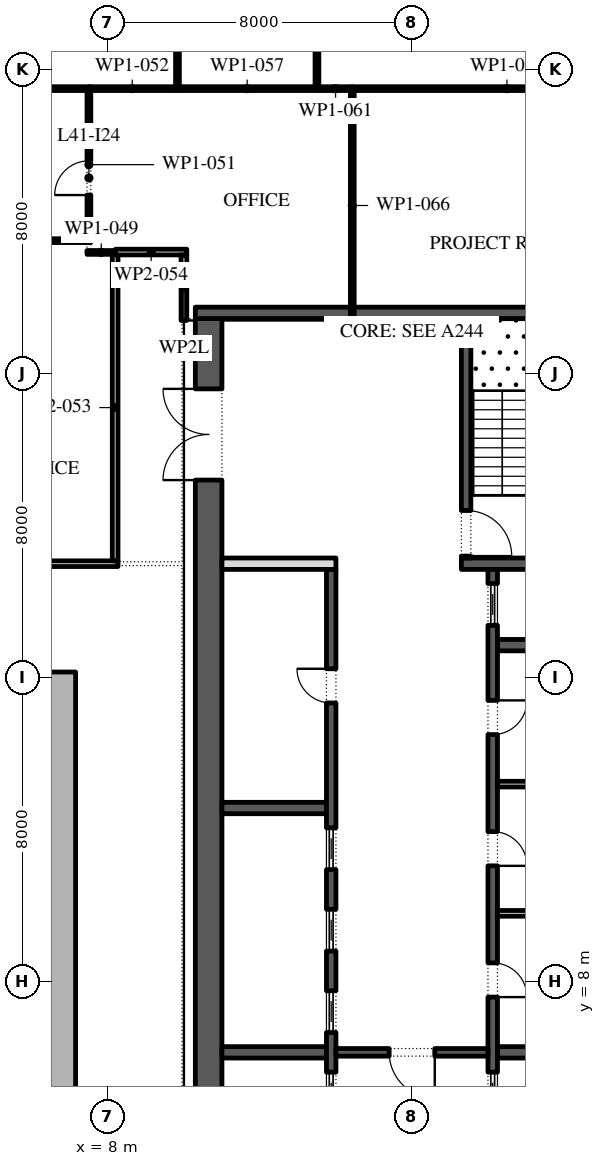
"""IFC4 building model, lengths in metres.
Left out: names, types, materials, properties, quantities, classifications, styles, units other than length and angle.
Written with IfcOpenShell. Run it as: python <this file> out.ifc"""

import sys

from ifc_helpers import new_model, si_unit, direction, frame, frame_2d, origin, place, context, subcontext, project, spatial, polyline, rectangle, outline, extrude, element, fill, save


model = new_model("IFC4")
c1 = context("Model", 3, precision=1e-05, world=origin(), true_north=direction((0.0, 1.0)))
c2 = subcontext(c1, "Body", "Model", "MODEL_VIEW")
j1 = project(units=[si_unit("LENGTHUNIT", "METRE"), si_unit("PLANEANGLEUNIT", "RADIAN")], contexts=[c1])
p1 = place(None, origin())
s1 = spatial("IfcSite", under=j1, at=p1, CompositionType="ELEMENT")
p2 = place(p1, origin())
s2 = spatial("IfcBuilding", under=s1, at=p2, CompositionType="ELEMENT")
p3 = place(p2, frame((0.0, 0.0, 188.4)))
s3 = spatial("IfcBuildingStorey", under=s2, at=p3, CompositionType="ELEMENT", Elevation=188.4)
p4 = place(p3, origin())
e1 = element("IfcWall", 1, at=p4, inside=s3, PredefinedType="STANDARD", context=c2, shape_type="SweptSolid", body=[
    extrude(outline(polyline([(-7.15, -2.15), (7.15, -2.15), (7.15, 16.15), (-7.15, 16.15), (-7.15, -2.15)]), holes=[polyline([(-7.0, -2.0), (-7.0, 16.0), (7.0, 16.0), (7.0, -2.0), (-7.0, -2.0)])]), origin(), (0.0, 0.0, 1.0), 4.0),
])
p5 = place(p3, frame((10.65, -2.45, 0.0), z_axis=(0.0, 0.0, 1.0), x_axis=(0.0, 1.0, 0.0)))
e2 = element("IfcWall", 2, at=p5, inside=s3, PredefinedType="SHEAR", context=c2, shape_type="SweptSolid", body=[
    extrude(rectangle(XDim=27.9, YDim=0.7, at=frame_2d((13.95, 0.0))), origin(), (0.0, 0.0, 1.0), 4.0),
])
p6 = place(p5, frame((23.65, 0.0, 0.0)))
e3 = element("IfcOpeningElement", 3, at=p6, cuts=e2, PredefinedType="OPENING", context=c2, shape_type="SweptSolid", body=[
    extrude(rectangle(XDim=2.4, YDim=2.1, at=frame_2d((1.2, 1.05))), frame((0.0, 0.36, 0.0), z_axis=(0.0, -1.0, 0.0), x_axis=(1.0, 0.0, 0.0)), (0.0, 0.0, 1.0), 0.72),
])
p7 = place(p5, frame((1.387, 0.0, 0.0)))
e4 = element("IfcOpeningElement", 4, at=p7, cuts=e2, PredefinedType="OPENING", context=c2, shape_type="SweptSolid", body=[
    extrude(rectangle(XDim=0.9, YDim=2.1, at=frame_2d((0.45, 1.05))), frame((0.0, 0.36, 0.0), z_axis=(0.0, -1.0, 0.0), x_axis=(1.0, 0.0, 0.0)), (0.0, 0.0, 1.0), 0.72),
])
p8 = place(p5, frame((4.562, 0.0, 0.0)))
e5 = element("IfcOpeningElement", 5, at=p8, cuts=e2, PredefinedType="OPENING", context=c2, shape_type="SweptSolid", body=[
    extrude(rectangle(XDim=1.0, YDim=2.1, at=frame_2d((0.5, 1.05))), frame((0.0, 0.36, 0.0), z_axis=(0.0, -1.0, 0.0), x_axis=(1.0, 0.0, 0.0)), (0.0, 0.0, 1.0), 0.72),
])
p9 = place(p3, frame((10.3, 25.6, 0.0), z_axis=(0.0, 0.0, 1.0), x_axis=(1.0, 0.0, 0.0)))
e6 = element("IfcWall", 6, at=p9, inside=s3, PredefinedType="SHEAR", context=c2, shape_type="SweptSolid", body=[
    extrude(rectangle(XDim=11.4, YDim=0.3, at=frame_2d((5.7, 0.0))), origin(), (0.0, 0.0, 1.0), 4.0),
])
p10 = place(p3, frame((17.3, 19.0, 0.0), z_axis=(0.0, 0.0, 1.0), x_axis=(1.0, 0.0, 0.0)))
e7 = element("IfcWall", 7, at=p10, inside=s3, PredefinedType="SHEAR", context=c2, shape_type="SweptSolid", body=[
    extrude(rectangle(XDim=3.7, YDim=0.3, at=frame_2d((1.85, 0.0))), origin(), (0.0, 0.0, 1.0), 4.0),
])
p11 = place(p3, frame((17.425, 19.15, 0.0), z_axis=(0.0, 0.0, 1.0), x_axis=(0.0, 1.0, 0.0)))
e8 = element("IfcWall", 8, at=p11, inside=s3, PredefinedType="SHEAR", context=c2, shape_type="SweptSolid", body=[
    extrude(rectangle(XDim=6.3, YDim=0.25, at=frame_2d((3.15, 0.0))), origin(), (0.0, 0.0, 1.0), 4.0),
])
p12 = place(p11, frame((0.05, 0.0, 0.0)))
e9 = element("IfcOpeningElement", 9, at=p12, cuts=e8, PredefinedType="OPENING", context=c2, shape_type="SweptSolid", body=[
    extrude(rectangle(XDim=1.2, YDim=2.1, at=frame_2d((0.6, 1.05))), frame((0.0, 0.135, 0.0), z_axis=(0.0, -1.0, 0.0), x_axis=(1.0, 0.0, 0.0)), (0.0, 0.0, 1.0), 0.27),
])
for number, where, z_axis, x_axis in (
    (10, (18.25, 6.143, 0.0), (0.0, 0.0, 1.0), (1.0, 0.0, 0.0)),
    (11, (18.25, 16.857, 0.0), (0.0, 0.0, 1.0), (1.0, 0.0, 0.0)),
):
    element("IfcWall", number, at=place(p3, frame(where, z_axis=z_axis, x_axis=x_axis)), inside=s3, PredefinedType="SHEAR", context=c2, shape_type="SweptSolid", body=[
        extrude(rectangle(XDim=2.75, YDim=0.3, at=frame_2d((1.375, 0.0))), origin(), (0.0, 0.0, 1.0), 4.0),
    ])
p13 = place(p3, frame((18.125, 4.15, 0.0), z_axis=(0.0, 0.0, 1.0), x_axis=(0.0, 1.0, 0.0)))
e12 = element("IfcWall", 12, at=p13, inside=s3, PredefinedType="SHEAR", context=c2, shape_type="SweptSolid", body=[
    extrude(rectangle(XDim=14.7, YDim=0.25, at=frame_2d((7.35, 0.0))), origin(), (0.0, 0.0, 1.0), 4.0),
])
p14 = place(p13, frame((3.446, 0.0, 0.0)))
e13 = element("IfcOpeningElement", 13, at=p14, cuts=e12, PredefinedType="OPENING", context=c2, shape_type="SweptSolid", body=[
    extrude(rectangle(XDim=0.9, YDim=2.1, at=frame_2d((0.45, 1.05))), frame((0.0, 0.135, 0.0), z_axis=(0.0, -1.0, 0.0), x_axis=(1.0, 0.0, 0.0)), (0.0, 0.0, 1.0), 0.27),
])
p15 = place(p13, frame((6.9, 0.0, 0.0)))
e14 = element("IfcOpeningElement", 14, at=p15, cuts=e12, PredefinedType="OPENING", context=c2, shape_type="SweptSolid", body=[
    extrude(rectangle(XDim=0.9, YDim=2.1, at=frame_2d((0.45, 1.05))), frame((0.0, 0.135, 0.0), z_axis=(0.0, -1.0, 0.0), x_axis=(1.0, 0.0, 0.0)), (0.0, 0.0, 1.0), 0.27),
])
p16 = place(p13, frame((10.354, 0.0, 0.0)))
e15 = element("IfcOpeningElement", 15, at=p16, cuts=e12, PredefinedType="OPENING", context=c2, shape_type="SweptSolid", body=[
    extrude(rectangle(XDim=0.9, YDim=2.1, at=frame_2d((0.45, 1.05))), frame((0.0, 0.135, 0.0), z_axis=(0.0, -1.0, 0.0), x_axis=(1.0, 0.0, 0.0)), (0.0, 0.0, 1.0), 0.27),
])
p17 = place(p13, frame((0.371, 0.0, 0.0)))
e16 = element("IfcOpeningElement", 16, at=p17, cuts=e12, PredefinedType="OPENING", context=c2, shape_type="SweptSolid", body=[
    extrude(rectangle(XDim=1.1, YDim=2.1, at=frame_2d((0.55, 1.05))), frame((0.0, 0.135, 0.0), z_axis=(0.0, -1.0, 0.0), x_axis=(1.0, 0.0, 0.0)), (0.0, 0.0, 1.0), 0.27),
])
p18 = place(p13, frame((13.229, 0.0, 0.0)))
e17 = element("IfcOpeningElement", 17, at=p18, cuts=e12, PredefinedType="OPENING", context=c2, shape_type="SweptSolid", body=[
    extrude(rectangle(XDim=1.1, YDim=2.1, at=frame_2d((0.55, 1.05))), frame((0.0, 0.135, 0.0), z_axis=(0.0, -1.0, 0.0), x_axis=(1.0, 0.0, 0.0)), (0.0, 0.0, 1.0), 0.27),
])
for number, where, z_axis, x_axis in (
    (18, (18.25, 9.8, 0.0), (0.0, 0.0, 1.0), (1.0, 0.0, 0.0)),
    (19, (18.25, 13.2, 0.0), (0.0, 0.0, 1.0), (1.0, 0.0, 0.0)),
):
    element("IfcWall", number, at=place(p3, frame(where, z_axis=z_axis, x_axis=x_axis)), inside=s3, PredefinedType="PARTITIONING", context=c2, shape_type="SweptSolid", body=[
        extrude(rectangle(XDim=2.75, YDim=0.15, at=frame_2d((1.375, 0.0))), origin(), (0.0, 0.0, 1.0), 4.0),
    ])
for number, where, z_axis, x_axis in (
    (20, (11.0, 6.143, 0.0), (0.0, 0.0, 1.0), (1.0, 0.0, 0.0)),
    (21, (11.0, 12.571, 0.0), (0.0, 0.0, 1.0), (1.0, 0.0, 0.0)),
):
    element("IfcWall", number, at=place(p3, frame(where, z_axis=z_axis, x_axis=x_axis)), inside=s3, PredefinedType="SHEAR", context=c2, shape_type="SweptSolid", body=[
        extrude(rectangle(XDim=2.75, YDim=0.3, at=frame_2d((1.375, 0.0))), origin(), (0.0, 0.0, 1.0), 4.0),
    ])
p19 = place(p3, frame((13.875, -2.45, 0.0), z_axis=(0.0, 0.0, 1.0), x_axis=(0.0, 1.0, 0.0)))
e22 = element("IfcWall", 22, at=p19, inside=s3, PredefinedType="SHEAR", context=c2, shape_type="SweptSolid", body=[
    extrude(rectangle(XDim=21.3, YDim=0.25, at=frame_2d((10.65, 0.0))), origin(), (0.0, 0.0, 1.0), 4.0),
])
p20 = place(p19, frame((17.786, 0.0, 0.0)))
e23 = element("IfcOpeningElement", 23, at=p20, cuts=e22, PredefinedType="OPENING", context=c2, shape_type="SweptSolid", body=[
    extrude(rectangle(XDim=0.9, YDim=2.1, at=frame_2d((0.45, 1.05))), frame((0.0, 0.135, 0.0), z_axis=(0.0, -1.0, 0.0), x_axis=(1.0, 0.0, 0.0)), (0.0, 0.0, 1.0), 0.27),
])
p21 = place(p19, frame((6.971, 0.0, 0.0)))
e24 = element("IfcOpeningElement", 24, at=p21, cuts=e22, PredefinedType="OPENING", context=c2, shape_type="SweptSolid", body=[
    extrude(rectangle(XDim=1.1, YDim=2.1, at=frame_2d((0.55, 1.05))), frame((0.0, 0.135, 0.0), z_axis=(0.0, -1.0, 0.0), x_axis=(1.0, 0.0, 0.0)), (0.0, 0.0, 1.0), 0.27),
])
p22 = place(p19, frame((9.114, 0.0, 0.0)))
e25 = element("IfcOpeningElement", 25, at=p22, cuts=e22, PredefinedType="OPENING", context=c2, shape_type="SweptSolid", body=[
    extrude(rectangle(XDim=1.1, YDim=2.1, at=frame_2d((0.55, 1.05))), frame((0.0, 0.135, 0.0), z_axis=(0.0, -1.0, 0.0), x_axis=(1.0, 0.0, 0.0)), (0.0, 0.0, 1.0), 0.27),
])
p23 = place(p19, frame((11.257, 0.0, 0.0)))
e26 = element("IfcOpeningElement", 26, at=p23, cuts=e22, PredefinedType="OPENING", context=c2, shape_type="SweptSolid", body=[
    extrude(rectangle(XDim=1.1, YDim=2.1, at=frame_2d((0.55, 1.05))), frame((0.0, 0.135, 0.0), z_axis=(0.0, -1.0, 0.0), x_axis=(1.0, 0.0, 0.0)), (0.0, 0.0, 1.0), 0.27),
])
p24 = place(p19, frame((13.4, 0.0, 0.0)))
e27 = element("IfcOpeningElement", 27, at=p24, cuts=e22, PredefinedType="OPENING", context=c2, shape_type="SweptSolid", body=[
    extrude(rectangle(XDim=1.1, YDim=2.1, at=frame_2d((0.55, 1.05))), frame((0.0, 0.135, 0.0), z_axis=(0.0, -1.0, 0.0), x_axis=(1.0, 0.0, 0.0)), (0.0, 0.0, 1.0), 0.27),
])
p25 = place(p3, frame((11.0, 19.0, 0.0), z_axis=(0.0, 0.0, 1.0), x_axis=(1.0, 0.0, 0.0)))
e28 = element("IfcWall", 28, at=p25, inside=s3, PredefinedType="PARTITIONING", context=c2, shape_type="SweptSolid", body=[
    extrude(rectangle(XDim=3.0, YDim=0.3, at=frame_2d((1.5, 0.0))), origin(), (0.0, 0.0, 1.0), 4.0),
])
p26 = place(p3, frame((14.0, 6.143, 0.0), z_axis=(0.0, 0.0, 1.0), x_axis=(1.0, 0.0, 0.0)))
e29 = element("IfcWall", 29, at=p26, inside=s3, PredefinedType="SHEAR", context=c2, shape_type="SweptSolid", body=[
    extrude(rectangle(XDim=4.0, YDim=0.2, at=frame_2d((2.0, 0.0))), origin(), (0.0, 0.0, 1.0), 4.0),
])
p27 = place(p26, frame((1.4, 0.0, 0.0)))
e30 = element("IfcOpeningElement", 30, at=p27, cuts=e29, PredefinedType="OPENING", context=c2, shape_type="SweptSolid", body=[
    extrude(rectangle(XDim=1.2, YDim=2.1, at=frame_2d((0.6, 1.05))), frame((0.0, 0.11, 0.0), z_axis=(0.0, -1.0, 0.0), x_axis=(1.0, 0.0, 0.0)), (0.0, 0.0, 1.0), 0.22),
])
p28 = place(p3, frame((0.915, 19.0, 0.0), z_axis=(0.0, 0.0, 1.0), x_axis=(1.0, 0.0, 0.0)))
e31 = element("IfcWall", 31, at=p28, inside=s3, PredefinedType="PARTITIONING", context=c2, shape_type="SweptSolid", body=[
    extrude(rectangle(XDim=7.35, YDim=0.15, at=frame_2d((3.675, 0.0))), origin(), (0.0, 0.0, 1.0), 4.0),
])
p29 = place(p3, frame((1.065, 31.5, 0.0), z_axis=(0.0, 0.0, 1.0), x_axis=(1.0, 0.0, 0.0)))
e32 = element("IfcWall", 32, at=p29, inside=s3, PredefinedType="PARTITIONING", context=c2, shape_type="SweptSolid", body=[
    extrude(rectangle(XDim=6.485, YDim=0.1, at=frame_2d((3.243, 0.0))), origin(), (0.0, 0.0, 1.0), 4.0),
])
p30 = place(p3, frame((7.45, 27.19, 0.0), z_axis=(0.0, 0.0, 1.0), x_axis=(1.0, 0.0, 0.0)))
e33 = element("IfcWall", 33, at=p30, inside=s3, PredefinedType="PARTITIONING", context=c2, shape_type="SweptSolid", body=[
    extrude(rectangle(XDim=0.75, YDim=0.1, at=frame_2d((0.375, 0.0))), origin(), (0.0, 0.0, 1.0), 4.0),
])
p31 = place(p3, frame((7.55, 27.5, 0.0), z_axis=(0.0, 0.0, 1.0), x_axis=(-1.0, 0.0, 0.0)))
e34 = element("IfcWall", 34, at=p31, inside=s3, PredefinedType="PARTITIONING", context=c2, shape_type="SweptSolid", body=[
    extrude(rectangle(XDim=6.485, YDim=0.1, at=frame_2d((3.243, 0.0))), origin(), (0.0, 0.0, 1.0), 4.0),
])
p32 = place(p3, frame((7.5, 31.45, 0.0), z_axis=(0.0, 0.0, 1.0), x_axis=(0.0, -1.0, 0.0)))
e35 = element("IfcWall", 35, at=p32, inside=s3, PredefinedType="PARTITIONING", context=c2, shape_type="SweptSolid", body=[
    extrude(rectangle(XDim=3.9, YDim=0.1, at=frame_2d((1.95, 0.0))), origin(), (0.0, 0.0, 1.0), 4.0),
])
p33 = place(p32, frame((1.85, 0.0, 0.0)))
e36 = element("IfcOpeningElement", 36, at=p33, cuts=e35, PredefinedType="OPENING", context=c2, shape_type="SweptSolid", body=[
    extrude(rectangle(XDim=0.9, YDim=2.1, at=frame_2d((0.45, 1.05))), frame((0.0, 0.06, 0.0), z_axis=(0.0, -1.0, 0.0), x_axis=(1.0, 0.0, 0.0)), (0.0, 0.0, 1.0), 0.12),
])
p34 = place(p3, frame((7.5, 31.5, 0.0), z_axis=(0.0, 0.0, 1.0), x_axis=(1.0, 0.0, 0.0)))
e37 = element("IfcWall", 37, at=p34, inside=s3, PredefinedType="PARTITIONING", context=c2, shape_type="SweptSolid", body=[
    extrude(rectangle(XDim=2.28, YDim=0.1, at=frame_2d((1.14, 0.0))), origin(), (0.0, 0.0, 1.0), 4.0),
])
p35 = place(p3, frame((8.19, 19.075, 0.0), z_axis=(0.0, 0.0, 1.0), x_axis=(0.0, 1.0, 0.0)))
e38 = element("IfcWall", 38, at=p35, inside=s3, PredefinedType="PARTITIONING", context=c2, shape_type="SweptSolid", body=[
    extrude(rectangle(XDim=8.065, YDim=0.15, at=frame_2d((4.032, 0.0))), origin(), (0.0, 0.0, 1.0), 4.0),
])
p36 = place(p3, frame((8.2, 27.2, 0.0), z_axis=(0.0, 0.0, 1.0), x_axis=(1.0, 0.0, 0.0)))
e39 = element("IfcWall", 39, at=p36, inside=s3, PredefinedType="PARTITIONING", context=c2, shape_type="SweptSolid", body=[
    extrude(rectangle(XDim=1.875, YDim=0.15, at=frame_2d((0.938, 0.0))), origin(), (0.0, 0.0, 1.0), 4.0),
])
p37 = place(p3, frame((9.78, 31.5, 0.0), z_axis=(0.0, 0.0, 1.0), x_axis=(1.0, 0.0, 0.0)))
e40 = element("IfcWall", 40, at=p37, inside=s3, PredefinedType="PARTITIONING", context=c2, shape_type="SweptSolid", body=[
    extrude(rectangle(XDim=3.77, YDim=0.1, at=frame_2d((1.885, 0.0))), origin(), (0.0, 0.0, 1.0), 4.0),
])
p38 = place(p3, frame((9.83, 39.95, 0.0), z_axis=(0.0, 0.0, 1.0), x_axis=(0.0, -1.0, 0.0)))
e41 = element("IfcWall", 41, at=p38, inside=s3, PredefinedType="PARTITIONING", context=c2, shape_type="SweptSolid", body=[
    extrude(rectangle(XDim=8.4, YDim=0.1, at=frame_2d((4.2, 0.0))), origin(), (0.0, 0.0, 1.0), 4.0),
])
p39 = place(p38, frame((4.6, 0.0, 0.0)))
e42 = element("IfcOpeningElement", 42, at=p39, cuts=e41, PredefinedType="OPENING", context=c2, shape_type="SweptSolid", body=[
    extrude(rectangle(XDim=0.9, YDim=2.1, at=frame_2d((0.45, 1.05))), frame((0.0, 0.06, 0.0), z_axis=(0.0, -1.0, 0.0), x_axis=(1.0, 0.0, 0.0)), (0.0, 0.0, 1.0), 0.12),
])
p40 = place(p3, frame((10.0, 27.125, 0.0), z_axis=(0.0, 0.0, 1.0), x_axis=(0.0, -1.0, 0.0)))
e43 = element("IfcWall", 43, at=p40, inside=s3, PredefinedType="PARTITIONING", context=c2, shape_type="SweptSolid", body=[
    extrude(rectangle(XDim=1.725, YDim=0.15, at=frame_2d((0.863, 0.0))), origin(), (0.0, 0.0, 1.0), 3.02),
])
p41 = place(p3, frame((13.55, 31.5, 0.0), z_axis=(0.0, 0.0, 1.0), x_axis=(1.0, 0.0, 0.0)))
e44 = element("IfcWall", 44, at=p41, inside=s3, PredefinedType="PARTITIONING", context=c2, shape_type="SweptSolid", body=[
    extrude(rectangle(XDim=0.88, YDim=0.1, at=frame_2d((0.44, 0.0))), origin(), (0.0, 0.0, 1.0), 4.0),
])
p42 = place(p3, frame((13.5, 39.95, 0.0), z_axis=(0.0, 0.0, 1.0), x_axis=(0.0, -1.0, 0.0)))
e45 = element("IfcWall", 45, at=p42, inside=s3, PredefinedType="PARTITIONING", context=c2, shape_type="SweptSolid", body=[
    extrude(rectangle(XDim=8.4, YDim=0.1, at=frame_2d((4.2, 0.0))), origin(), (0.0, 0.0, 1.0), 4.0),
])
p43 = place(p3, frame((14.43, 31.45, 0.0), z_axis=(0.0, 0.0, 1.0), x_axis=(0.0, -1.0, 0.0)))
e46 = element("IfcWall", 46, at=p43, inside=s3, PredefinedType="PARTITIONING", context=c2, shape_type="SweptSolid", body=[
    extrude(rectangle(XDim=6.05, YDim=0.1, at=frame_2d((3.025, 0.0))), origin(), (0.0, 0.0, 1.0), 4.0),
])
p44 = place(p3, frame((14.43, 31.5, 0.0), z_axis=(0.0, 0.0, 1.0), x_axis=(1.0, 0.0, 0.0)))
e47 = element("IfcWall", 47, at=p44, inside=s3, PredefinedType="PARTITIONING", context=c2, shape_type="SweptSolid", body=[
    extrude(rectangle(XDim=8.14, YDim=0.1, at=frame_2d((4.07, 0.0))), origin(), (0.0, 0.0, 1.0), 4.0),
])
p45 = place(p14, frame((0.9, -0.2, 0.0), z_axis=(0.0, 0.0, 1.0), x_axis=(-1.0, 0.0, 0.0)))
e48 = element("IfcDoor", 48, at=p45, inside=s3, OperationType="SINGLE_SWING_LEFT", PredefinedType="DOOR", context=c2, shape_type="SweptSolid", body=[
    extrude(rectangle(XDim=0.9, YDim=2.1, at=frame_2d((0.45, 1.05))), frame((0.0, -0.075, 0.0), z_axis=(0.0, -1.0, 0.0), x_axis=(1.0, 0.0, 0.0)), (0.0, 0.0, 1.0), 0.05),
])
fill(e13, e48)
p46 = place(p15, frame((0.9, -0.2, 0.0), z_axis=(0.0, 0.0, 1.0), x_axis=(-1.0, 0.0, 0.0)))
e49 = element("IfcDoor", 49, at=p46, inside=s3, OperationType="SINGLE_SWING_LEFT", PredefinedType="DOOR", context=c2, shape_type="SweptSolid", body=[
    extrude(rectangle(XDim=0.9, YDim=2.1, at=frame_2d((0.45, 1.05))), frame((0.0, -0.075, 0.0), z_axis=(0.0, -1.0, 0.0), x_axis=(1.0, 0.0, 0.0)), (0.0, 0.0, 1.0), 0.05),
])
fill(e14, e49)
p47 = place(p16, frame((0.9, -0.2, 0.0), z_axis=(0.0, 0.0, 1.0), x_axis=(-1.0, 0.0, 0.0)))
e50 = element("IfcDoor", 50, at=p47, inside=s3, OperationType="SINGLE_SWING_RIGHT", PredefinedType="DOOR", context=c2, shape_type="SweptSolid", body=[
    extrude(rectangle(XDim=0.9, YDim=2.1, at=frame_2d((0.45, 1.05))), frame((0.0, -0.075, 0.0), z_axis=(0.0, -1.0, 0.0), x_axis=(1.0, 0.0, 0.0)), (0.0, 0.0, 1.0), 0.05),
])
fill(e15, e50)
p48 = place(p17, origin())
e51 = element("IfcDoor", 51, at=p48, inside=s3, OperationType="SLIDING_TO_LEFT", PredefinedType="DOOR", context=c2, shape_type="SweptSolid", body=[
    extrude(rectangle(XDim=1.1, YDim=2.1, at=frame_2d((0.55, 1.05))), frame((0.0, 0.025, 0.0), z_axis=(0.0, -1.0, 0.0), x_axis=(1.0, 0.0, 0.0)), (0.0, 0.0, 1.0), 0.05),
])
fill(e16, e51)
p49 = place(p18, origin())
e52 = element("IfcDoor", 52, at=p49, inside=s3, OperationType="SLIDING_TO_LEFT", PredefinedType="DOOR", context=c2, shape_type="SweptSolid", body=[
    extrude(rectangle(XDim=1.1, YDim=2.1, at=frame_2d((0.55, 1.05))), frame((0.0, 0.025, 0.0), z_axis=(0.0, -1.0, 0.0), x_axis=(1.0, 0.0, 0.0)), (0.0, 0.0, 1.0), 0.05),
])
fill(e17, e52)
p50 = place(p20, origin())
e53 = element("IfcDoor", 53, at=p50, inside=s3, OperationType="SINGLE_SWING_LEFT", PredefinedType="DOOR", context=c2, shape_type="SweptSolid", body=[
    extrude(rectangle(XDim=0.9, YDim=2.1, at=frame_2d((0.45, 1.05))), frame((0.0, 0.125, 0.0), z_axis=(0.0, -1.0, 0.0), x_axis=(1.0, 0.0, 0.0)), (0.0, 0.0, 1.0), 0.05),
])
fill(e23, e53)
p51 = place(p21, origin())
e54 = element("IfcDoor", 54, at=p51, inside=s3, OperationType="SLIDING_TO_LEFT", PredefinedType="DOOR", context=c2, shape_type="SweptSolid", body=[
    extrude(rectangle(XDim=1.1, YDim=2.1, at=frame_2d((0.55, 1.05))), frame((0.0, 0.025, 0.0), z_axis=(0.0, -1.0, 0.0), x_axis=(1.0, 0.0, 0.0)), (0.0, 0.0, 1.0), 0.05),
])
fill(e24, e54)
p52 = place(p22, origin())
e55 = element("IfcDoor", 55, at=p52, inside=s3, OperationType="SLIDING_TO_LEFT", PredefinedType="DOOR", context=c2, shape_type="SweptSolid", body=[
    extrude(rectangle(XDim=1.1, YDim=2.1, at=frame_2d((0.55, 1.05))), frame((0.0, 0.025, 0.0), z_axis=(0.0, -1.0, 0.0), x_axis=(1.0, 0.0, 0.0)), (0.0, 0.0, 1.0), 0.05),
])
fill(e25, e55)
p53 = place(p23, origin())
e56 = element("IfcDoor", 56, at=p53, inside=s3, OperationType="SLIDING_TO_LEFT", PredefinedType="DOOR", context=c2, shape_type="SweptSolid", body=[
    extrude(rectangle(XDim=1.1, YDim=2.1, at=frame_2d((0.55, 1.05))), frame((0.0, 0.025, 0.0), z_axis=(0.0, -1.0, 0.0), x_axis=(1.0, 0.0, 0.0)), (0.0, 0.0, 1.0), 0.05),
])
fill(e26, e56)
p54 = place(p24, origin())
e57 = element("IfcDoor", 57, at=p54, inside=s3, OperationType="SLIDING_TO_LEFT", PredefinedType="DOOR", context=c2, shape_type="SweptSolid", body=[
    extrude(rectangle(XDim=1.1, YDim=2.1, at=frame_2d((0.55, 1.05))), frame((0.0, 0.025, 0.0), z_axis=(0.0, -1.0, 0.0), x_axis=(1.0, 0.0, 0.0)), (0.0, 0.0, 1.0), 0.05),
])
fill(e27, e57)
p55 = place(p27, frame((1.2, 0.0, 0.0), z_axis=(0.0, 0.0, 1.0), x_axis=(-1.0, 0.0, 0.0)))
e58 = element("IfcDoor", 58, at=p55, inside=s3, OperationType="SINGLE_SWING_RIGHT", PredefinedType="DOOR", context=c2, shape_type="SweptSolid", body=[
    extrude(rectangle(XDim=1.2, YDim=2.1, at=frame_2d((0.6, 1.05))), frame((0.0, 0.025, 0.0), z_axis=(0.0, -1.0, 0.0), x_axis=(1.0, 0.0, 0.0)), (0.0, 0.0, 1.0), 0.05),
])
fill(e30, e58)
p56 = place(p6, origin())
e59 = element("IfcDoor", 59, at=p56, inside=s3, OperationType="DOUBLE_DOOR_SINGLE_SWING", PredefinedType="DOOR", context=c2, shape_type="SweptSolid", body=[
    extrude(rectangle(XDim=2.4, YDim=2.1, at=frame_2d((1.2, 1.05))), frame((0.0, 0.025, 0.0), z_axis=(0.0, -1.0, 0.0), x_axis=(1.0, 0.0, 0.0)), (0.0, 0.0, 1.0), 0.05),
])
fill(e3, e59)
p57 = place(p12, frame((1.2, 0.0, 0.0), z_axis=(0.0, 0.0, 1.0), x_axis=(-1.0, 0.0, 0.0)))
e60 = element("IfcDoor", 60, at=p57, inside=s3, OperationType="SINGLE_SWING_LEFT", PredefinedType="DOOR", context=c2, shape_type="SweptSolid", body=[
    extrude(rectangle(XDim=1.2, YDim=2.1, at=frame_2d((0.6, 1.05))), frame((0.0, 0.025, 0.0), z_axis=(0.0, -1.0, 0.0), x_axis=(1.0, 0.0, 0.0)), (0.0, 0.0, 1.0), 0.05),
])
fill(e9, e60)
p58 = place(p33, frame((0.9, 0.0, 0.0), z_axis=(0.0, 0.0, 1.0), x_axis=(-1.0, 0.0, 0.0)))
e61 = element("IfcDoor", 61, at=p58, inside=s3, OperationType="SINGLE_SWING_RIGHT", PredefinedType="DOOR", context=c2, shape_type="SweptSolid", body=[
    extrude(rectangle(XDim=0.9, YDim=2.1, at=frame_2d((0.45, 1.05))), frame((0.0, 0.025, 0.0), z_axis=(0.0, -1.0, 0.0), x_axis=(1.0, 0.0, 0.0)), (0.0, 0.0, 1.0), 0.05),
])
fill(e36, e61)
save(model, sys.argv[1])
